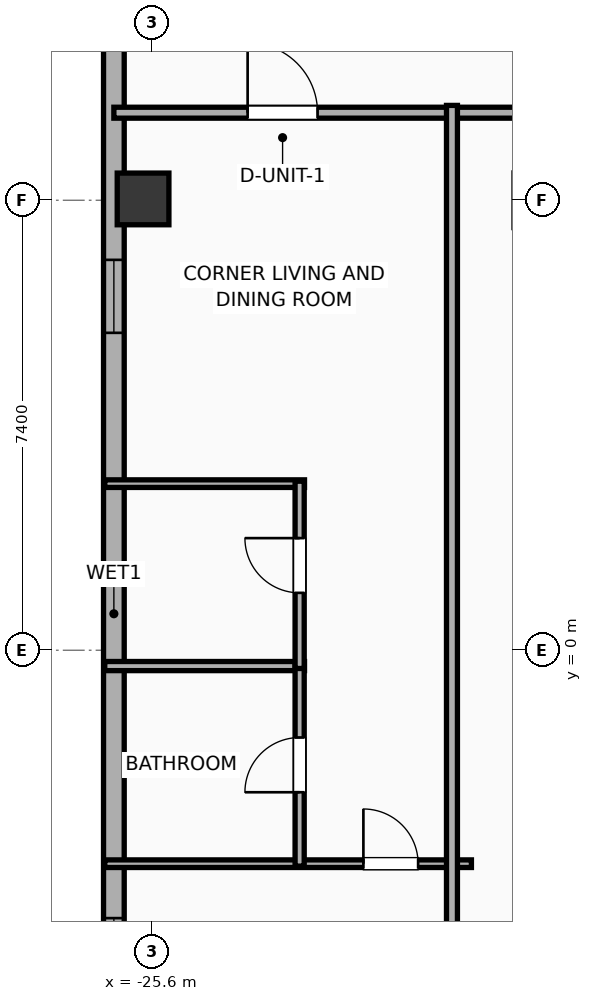
"""IFC4 building model, lengths in metres.
Left out: names, types, materials, properties, quantities, classifications, styles, units other than length and angle.
Written with IfcOpenShell. Run it as: python <this file> out.ifc"""

import sys

from ifc_helpers import new_model, si_unit, direction, frame, frame_2d, origin, origin_2d, place, context, subcontext, project, spatial, rectangle, hollow_rectangle, extrude, element, fill, save


model = new_model("IFC4")
c1 = context("Model", 3, precision=1e-05, world=origin(), true_north=direction((0.0, 1.0)))
c2 = subcontext(c1, "Body", "Model", "MODEL_VIEW")
j1 = project(units=[si_unit("LENGTHUNIT", "METRE"), si_unit("PLANEANGLEUNIT", "RADIAN")], contexts=[c1])
p1 = place(None, origin())
s1 = spatial("IfcSite", under=j1, at=p1, CompositionType="ELEMENT")
p2 = place(p1, origin())
s2 = spatial("IfcBuilding", under=s1, at=p2, CompositionType="ELEMENT")
p3 = place(p2, frame((0.0, 0.0, 239.2)))
s3 = spatial("IfcBuildingStorey", under=s2, at=p3, CompositionType="ELEMENT", Elevation=239.2)
p4 = place(p3, frame((-25.75, 7.422, 0.0), z_axis=(0.0, 0.0, 1.0), x_axis=(1.0, 0.0, 0.0)))
e1 = element("IfcColumn", 1, at=p4, inside=s3, PredefinedType="COLUMN", context=c2, shape_type="SweptSolid", body=[
    extrude(hollow_rectangle(XDim=0.85, YDim=0.85, WallThickness=0.028, at=origin_2d()), origin(), (0.0, 0.0, 1.0), 3.9),
])
p5 = place(p3, frame((-26.23, -15.383, 0.0), z_axis=(0.0, 0.0, 1.0), x_axis=(0.0, 1.0, 0.0)))
e2 = element("IfcWall", 2, at=p5, inside=s3, PredefinedType="ELEMENTEDWALL", context=c2, shape_type="SweptSolid", body=[
    extrude(rectangle(XDim=31.967, YDim=0.34, at=frame_2d((15.983, 0.0))), origin(), (0.0, 0.0, 1.0), 3.65),
])
p6 = place(p5, frame((29.431, 0.0, 0.75)))
e3 = element("IfcOpeningElement", 3, at=p6, cuts=e2, PredefinedType="OPENING", context=c2, shape_type="SweptSolid", body=[
    extrude(rectangle(XDim=1.2, YDim=2.05, at=frame_2d((0.6, 1.025))), frame((0.0, 0.18, 0.0), z_axis=(0.0, -1.0, 0.0), x_axis=(1.0, 0.0, 0.0)), (0.0, 0.0, 1.0), 0.36),
])
p7 = place(p5, frame((20.603, 0.0, 0.75)))
e4 = element("IfcOpeningElement", 4, at=p7, cuts=e2, PredefinedType="OPENING", context=c2, shape_type="SweptSolid", body=[
    extrude(rectangle(XDim=1.2, YDim=2.05, at=frame_2d((0.6, 1.025))), frame((0.0, 0.18, 0.0), z_axis=(0.0, -1.0, 0.0), x_axis=(1.0, 0.0, 0.0)), (0.0, 0.0, 1.0), 0.36),
])
p8 = place(p5, frame((9.778, 0.0, 0.75)))
e5 = element("IfcOpeningElement", 5, at=p8, cuts=e2, PredefinedType="OPENING", context=c2, shape_type="SweptSolid", body=[
    extrude(rectangle(XDim=1.2, YDim=2.05, at=frame_2d((0.6, 1.025))), frame((0.0, 0.18, 0.0), z_axis=(0.0, -1.0, 0.0), x_axis=(1.0, 0.0, 0.0)), (0.0, 0.0, 1.0), 0.36),
])
p9 = place(p3, frame((-26.23, 8.84, 0.0), z_axis=(0.0, 0.0, 1.0), x_axis=(1.0, 0.0, 0.0)))
e6 = element("IfcWall", 6, at=p9, inside=s3, PredefinedType="PARTITIONING", context=c2, shape_type="SweptSolid", body=[
    extrude(rectangle(XDim=16.35, YDim=0.18, at=frame_2d((8.175, 0.0))), origin(), (0.0, 0.0, 1.0), 3.65),
])
p10 = place(p9, frame((2.2, 0.0, 0.0)))
e7 = element("IfcOpeningElement", 7, at=p10, cuts=e6, PredefinedType="OPENING", context=c2, shape_type="SweptSolid", body=[
    extrude(rectangle(XDim=1.15, YDim=2.05, at=frame_2d((0.575, 1.025))), frame((0.0, 0.1, 0.0), z_axis=(0.0, -1.0, 0.0), x_axis=(1.0, 0.0, 0.0)), (0.0, 0.0, 1.0), 0.2),
])
p11 = place(p3, frame((-26.38, 2.74, 0.0), z_axis=(0.0, 0.0, 1.0), x_axis=(1.0, 0.0, 0.0)))
e8 = element("IfcWall", 8, at=p11, inside=s3, PredefinedType="PARTITIONING", context=c2, shape_type="SweptSolid", body=[
    extrude(rectangle(XDim=3.285, YDim=0.125, at=frame_2d((1.643, 0.0))), origin(), (0.0, 0.0, 1.0), 3.65),
])
p12 = place(p3, frame((-26.38, -0.26, 0.0), z_axis=(0.0, 0.0, 1.0), x_axis=(1.0, 0.0, 0.0)))
e9 = element("IfcWall", 9, at=p12, inside=s3, PredefinedType="PLUMBINGWALL", context=c2, shape_type="SweptSolid", body=[
    extrude(rectangle(XDim=3.285, YDim=0.15, at=frame_2d((1.643, 0.0))), origin(), (0.0, 0.0, 1.0), 3.65),
])
p13 = place(p3, frame((-26.38, -3.51, 0.0), z_axis=(0.0, 0.0, 1.0), x_axis=(1.0, 0.0, 0.0)))
e10 = element("IfcWall", 10, at=p13, inside=s3, PredefinedType="PARTITIONING", context=c2, shape_type="SweptSolid", body=[
    extrude(rectangle(XDim=6.03, YDim=0.125, at=frame_2d((3.015, 0.0))), origin(), (0.0, 0.0, 1.0), 3.65),
])
p14 = place(p13, frame((4.253, 0.0, 0.0)))
e11 = element("IfcOpeningElement", 11, at=p14, cuts=e10, PredefinedType="OPENING", context=c2, shape_type="SweptSolid", body=[
    extrude(rectangle(XDim=0.9, YDim=2.05, at=frame_2d((0.45, 1.025))), frame((0.0, 0.073, 0.0), z_axis=(0.0, -1.0, 0.0), x_axis=(1.0, 0.0, 0.0)), (0.0, 0.0, 1.0), 0.145),
])
p15 = place(p3, frame((-23.175, -3.55, 0.0), z_axis=(0.0, 0.0, 1.0), x_axis=(0.0, 1.0, 0.0)))
e12 = element("IfcWall", 12, at=p15, inside=s3, PredefinedType="PLUMBINGWALL", context=c2, shape_type="SweptSolid", body=[
    extrude(rectangle(XDim=3.33, YDim=0.15, at=frame_2d((1.665, 0.0))), origin(), (0.0, 0.0, 1.0), 3.65),
])
p16 = place(p15, frame((1.215, 0.0, 0.0)))
e13 = element("IfcOpeningElement", 13, at=p16, cuts=e12, PredefinedType="OPENING", context=c2, shape_type="SweptSolid", body=[
    extrude(rectangle(XDim=0.9, YDim=2.05, at=frame_2d((0.45, 1.025))), frame((0.0, 0.085, 0.0), z_axis=(0.0, -1.0, 0.0), x_axis=(1.0, 0.0, 0.0)), (0.0, 0.0, 1.0), 0.17),
])
p17 = place(p3, frame((-23.175, -0.3, 0.0), z_axis=(0.0, 0.0, 1.0), x_axis=(0.0, 1.0, 0.0)))
e14 = element("IfcWall", 14, at=p17, inside=s3, PredefinedType="PLUMBINGWALL", context=c2, shape_type="SweptSolid", body=[
    extrude(rectangle(XDim=3.08, YDim=0.15, at=frame_2d((1.54, 0.0))), origin(), (0.0, 0.0, 1.0), 3.65),
])
p18 = place(p17, frame((1.244, 0.0, 0.0)))
e15 = element("IfcOpeningElement", 15, at=p18, cuts=e14, PredefinedType="OPENING", context=c2, shape_type="SweptSolid", body=[
    extrude(rectangle(XDim=0.9, YDim=2.05, at=frame_2d((0.45, 1.025))), frame((0.0, 0.085, 0.0), z_axis=(0.0, -1.0, 0.0), x_axis=(1.0, 0.0, 0.0)), (0.0, 0.0, 1.0), 0.17),
])
p19 = place(p3, frame((-20.67, -8.96, 0.0), z_axis=(0.0, 0.0, 1.0), x_axis=(0.0, 1.0, 0.0)))
e16 = element("IfcWall", 16, at=p19, inside=s3, PredefinedType="PARTITIONING", context=c2, shape_type="SweptSolid", body=[
    extrude(rectangle(XDim=17.92, YDim=0.18, at=frame_2d((8.96, 0.0))), origin(), (0.0, 0.0, 1.0), 3.65),
])
p20 = place(p7, origin())
e17 = element("IfcWindow", 17, at=p20, inside=s3, PartitioningType="SINGLE_PANEL", PredefinedType="WINDOW", context=c2, shape_type="SweptSolid", body=[
    extrude(rectangle(XDim=1.2, YDim=2.05, at=frame_2d((0.6, 1.025))), frame((0.0, 0.03, 0.0), z_axis=(0.0, -1.0, 0.0), x_axis=(1.0, 0.0, 0.0)), (0.0, 0.0, 1.0), 0.06),
])
fill(e4, e17)
p21 = place(p8, origin())
e18 = element("IfcWindow", 18, at=p21, inside=s3, PartitioningType="SINGLE_PANEL", PredefinedType="WINDOW", context=c2, shape_type="SweptSolid", body=[
    extrude(rectangle(XDim=1.2, YDim=2.05, at=frame_2d((0.6, 1.025))), frame((0.0, 0.03, 0.0), z_axis=(0.0, -1.0, 0.0), x_axis=(1.0, 0.0, 0.0)), (0.0, 0.0, 1.0), 0.06),
])
fill(e5, e18)
p22 = place(p10, origin())
e19 = element("IfcDoor", 19, at=p22, inside=s3, OperationType="SINGLE_SWING_LEFT", PredefinedType="DOOR", context=c2, shape_type="SweptSolid", body=[
    extrude(rectangle(XDim=1.15, YDim=2.05, at=frame_2d((0.575, 1.025))), frame((0.0, 0.025, 0.0), z_axis=(0.0, -1.0, 0.0), x_axis=(1.0, 0.0, 0.0)), (0.0, 0.0, 1.0), 0.05),
])
fill(e7, e19)
p23 = place(p14, origin())
e20 = element("IfcDoor", 20, at=p23, inside=s3, OperationType="SINGLE_SWING_LEFT", PredefinedType="DOOR", context=c2, shape_type="SweptSolid", body=[
    extrude(rectangle(XDim=0.9, YDim=2.05, at=frame_2d((0.45, 1.025))), frame((0.0, 0.025, 0.0), z_axis=(0.0, -1.0, 0.0), x_axis=(1.0, 0.0, 0.0)), (0.0, 0.0, 1.0), 0.05),
])
fill(e11, e20)
p24 = place(p16, origin())
e21 = element("IfcDoor", 21, at=p24, inside=s3, OperationType="SINGLE_SWING_LEFT", PredefinedType="DOOR", context=c2, shape_type="SweptSolid", body=[
    extrude(rectangle(XDim=0.9, YDim=2.05, at=frame_2d((0.45, 1.025))), frame((0.0, 0.025, 0.0), z_axis=(0.0, -1.0, 0.0), x_axis=(1.0, 0.0, 0.0)), (0.0, 0.0, 1.0), 0.05),
])
fill(e13, e21)
p25 = place(p18, origin())
e22 = element("IfcDoor", 22, at=p25, inside=s3, OperationType="SINGLE_SWING_RIGHT", PredefinedType="DOOR", context=c2, shape_type="SweptSolid", body=[
    extrude(rectangle(XDim=0.9, YDim=2.05, at=frame_2d((0.45, 1.025))), frame((0.0, 0.025, 0.0), z_axis=(0.0, -1.0, 0.0), x_axis=(1.0, 0.0, 0.0)), (0.0, 0.0, 1.0), 0.05),
])
fill(e15, e22)
save(model, sys.argv[1])
